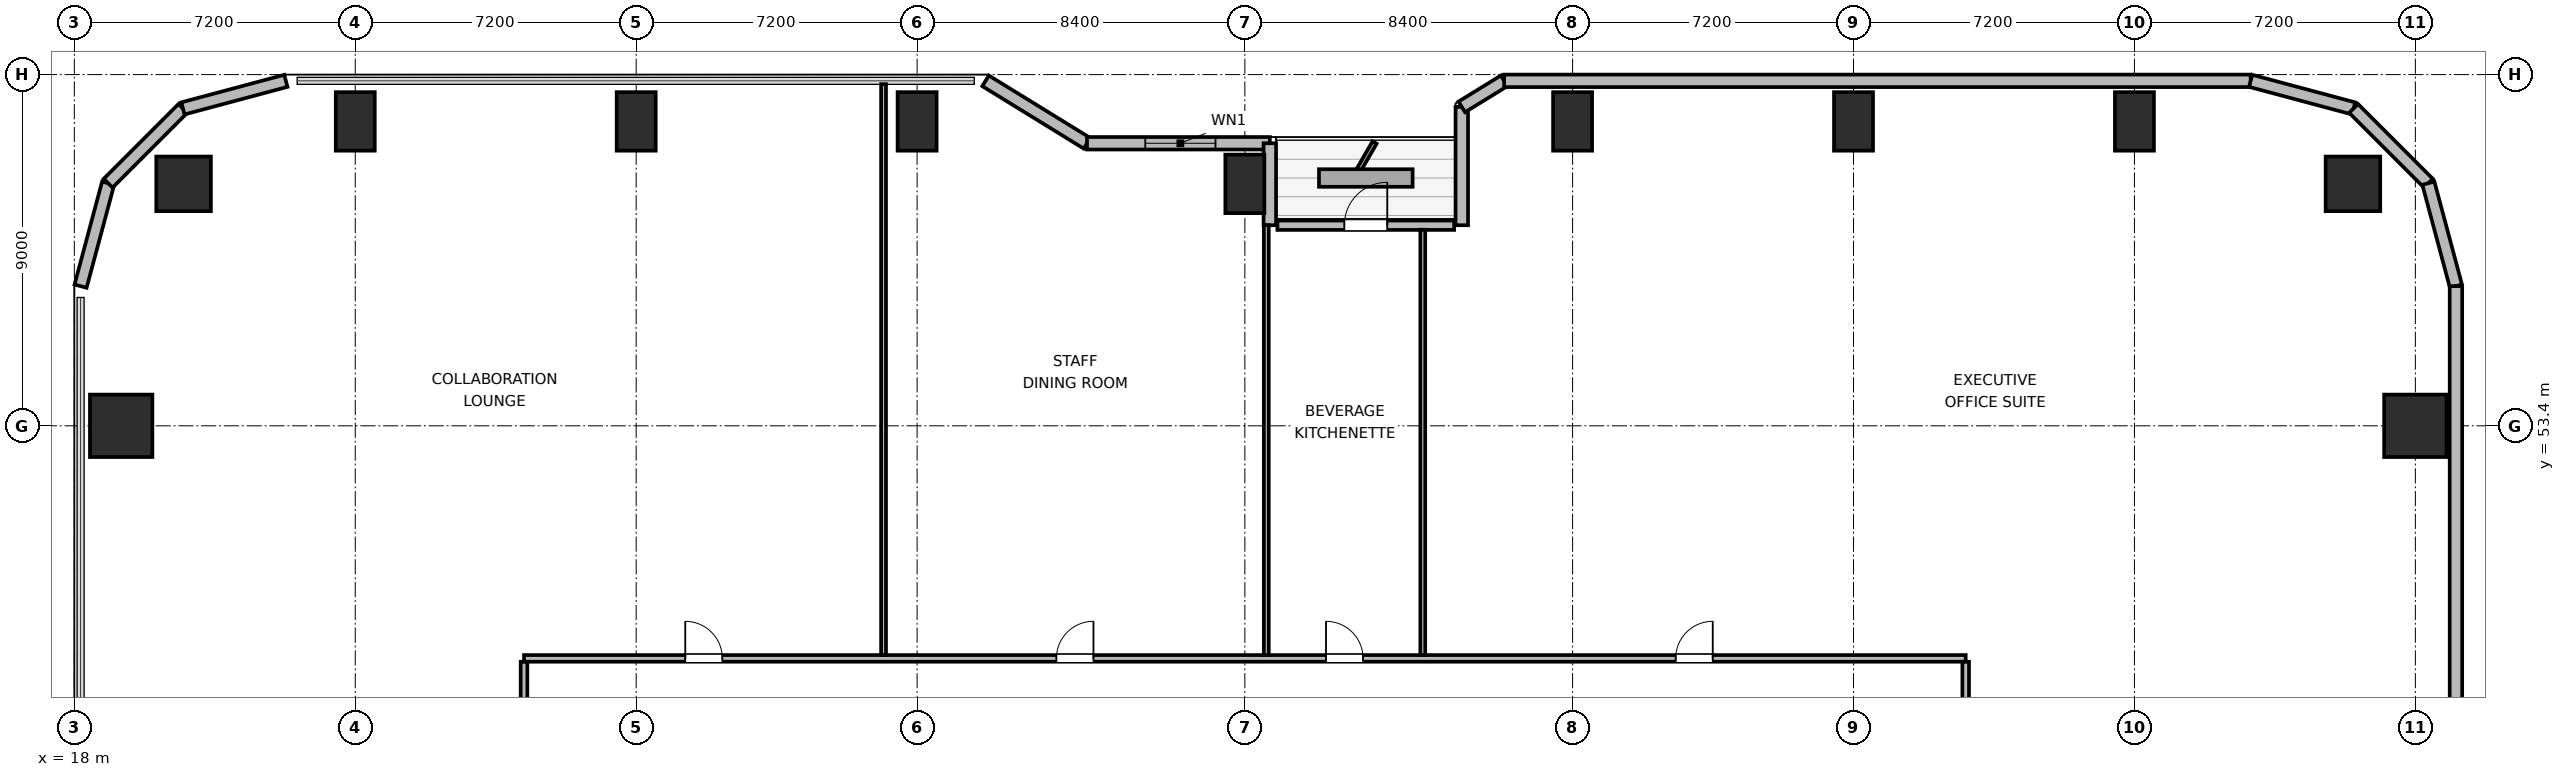
"""IFC4 building model, lengths in metres.
Left out: names, types, materials, properties, quantities, classifications, styles, units other than length and angle.
Written with IfcOpenShell. Run it as: python <this file> out.ifc"""

import sys

from ifc_helpers import new_model, si_unit, direction, frame, frame_2d, origin, origin_2d, place, context, subcontext, project, spatial, rectangle, circle, extrude, element, fill, save


model = new_model("IFC4")
c1 = context("Model", 3, precision=1e-05, world=origin(), true_north=direction((0.0, 1.0)))
c2 = subcontext(c1, "Body", "Model", "MODEL_VIEW")
j1 = project(units=[si_unit("LENGTHUNIT", "METRE"), si_unit("PLANEANGLEUNIT", "RADIAN")], contexts=[c1])
p1 = place(None, origin())
s1 = spatial("IfcSite", under=j1, at=p1, CompositionType="ELEMENT")
p2 = place(p1, origin())
s2 = spatial("IfcBuilding", under=s1, at=p2, CompositionType="ELEMENT")
p3 = place(p2, frame((0.0, 0.0, 56.7)))
s3 = spatial("IfcBuildingStorey", under=s2, at=p3, CompositionType="ELEMENT", Elevation=56.7)
for number, where, z_axis, x_axis in (
    (1, (76.4, 59.6, 0.0), (0.0, 0.0, 1.0), (1.0, 0.0, 0.0)),
    (2, (20.8, 59.6, 0.0), (0.0, 0.0, 1.0), (1.0, 0.0, 0.0)),
):
    element("IfcColumn", number, at=place(p3, frame(where, z_axis=z_axis, x_axis=x_axis)), inside=s3, PredefinedType="COLUMN", context=c2, shape_type="SweptSolid", body=[
        extrude(circle(Radius=0.7, at=origin_2d()), origin(), (0.0, 0.0, 1.0), 3.9),
    ])
for number, where, z_axis, x_axis in (
    (3, (25.2, 61.2, 0.0), (0.0, 0.0, 1.0), (1.0, 0.0, 0.0)),
    (4, (32.4, 61.2, 0.0), (0.0, 0.0, 1.0), (1.0, 0.0, 0.0)),
    (5, (39.6, 61.2, 0.0), (0.0, 0.0, 1.0), (1.0, 0.0, 0.0)),
    (6, (48.0, 59.6, 0.0), (0.0, 0.0, 1.0), (1.0, 0.0, 0.0)),
    (7, (56.4, 61.2, 0.0), (0.0, 0.0, 1.0), (1.0, 0.0, 0.0)),
    (8, (63.6, 61.2, 0.0), (0.0, 0.0, 1.0), (1.0, 0.0, 0.0)),
    (9, (70.8, 61.2, 0.0), (0.0, 0.0, 1.0), (1.0, 0.0, 0.0)),
):
    element("IfcColumn", number, at=place(p3, frame(where, z_axis=z_axis, x_axis=x_axis)), inside=s3, PredefinedType="COLUMN", context=c2, shape_type="SweptSolid", body=[
        extrude(rectangle(XDim=1.0, YDim=1.5, at=origin_2d()), origin(), (0.0, 0.0, 1.0), 3.9),
    ])
for number, where, z_axis, x_axis in (
    (10, (19.2, 53.4, 0.0), (0.0, 0.0, 1.0), (1.0, 0.0, 0.0)),
    (11, (78.0, 53.4, 0.0), (0.0, 0.0, 1.0), (1.0, 0.0, 0.0)),
):
    element("IfcColumn", number, at=place(p3, frame(where, z_axis=z_axis, x_axis=x_axis)), inside=s3, PredefinedType="COLUMN", context=c2, shape_type="SweptSolid", body=[
        extrude(rectangle(XDim=1.6, YDim=1.6, at=origin_2d()), origin(), (0.0, 0.0, 1.0), 3.9),
    ])
p4 = place(p3, frame((18.16, 56.979, 0.0), z_axis=(0.0, 0.0, 1.0), x_axis=(0.25869736047, 0.965958423373, 0.0)))
e12 = element("IfcWall", 12, at=p4, inside=s3, PredefinedType="SOLIDWALL", context=c2, shape_type="SweptSolid", body=[
    extrude(rectangle(XDim=2.731, YDim=0.32, at=frame_2d((1.366, 0.0))), origin(), (0.0, 0.0, 1.0), 3.64),
])
p5 = place(p3, frame((18.866, 59.617, 0.0), z_axis=(0.0, 0.0, 1.0), x_axis=(0.707106781187, 0.707106781187, 0.0)))
e13 = element("IfcWall", 13, at=p5, inside=s3, PredefinedType="SOLIDWALL", context=c2, shape_type="SweptSolid", body=[
    extrude(rectangle(XDim=2.71, YDim=0.32, at=frame_2d((1.355, 0.0))), origin(), (0.0, 0.0, 1.0), 3.64),
])
p6 = place(p3, frame((20.783, 61.533, 0.0), z_axis=(0.0, 0.0, 1.0), x_axis=(0.965964405026, 0.25867502435, 0.0)))
e14 = element("IfcWall", 14, at=p6, inside=s3, PredefinedType="SOLIDWALL", context=c2, shape_type="SweptSolid", body=[
    extrude(rectangle(XDim=2.731, YDim=0.32, at=frame_2d((1.366, 0.0))), origin(), (0.0, 0.0, 1.0), 3.64),
])
p7 = place(p3, frame((41.355, 62.24, 0.0), z_axis=(0.0, 0.0, 1.0), x_axis=(0.851630857047, -0.524142044989, 0.0)))
e15 = element("IfcWall", 15, at=p7, inside=s3, PredefinedType="SOLIDWALL", context=c2, shape_type="SweptSolid", body=[
    extrude(rectangle(XDim=3.053, YDim=0.32, at=frame_2d((1.526, 0.0))), origin(), (0.0, 0.0, 1.0), 2.875),
])
p8 = place(p3, frame((43.955, 60.64, 0.0), z_axis=(0.0, 0.0, 1.0), x_axis=(1.0, 0.0, 0.0)))
e16 = element("IfcWall", 16, at=p8, inside=s3, PredefinedType="SOLIDWALL", context=c2, shape_type="SweptSolid", body=[
    extrude(rectangle(XDim=4.685, YDim=0.32, at=frame_2d((2.343, 0.0))), origin(), (0.0, 0.0, 1.0), 2.875),
])
p9 = place(p8, frame((1.493, 0.0, 0.85)))
e17 = element("IfcOpeningElement", 17, at=p9, cuts=e16, PredefinedType="OPENING", context=c2, shape_type="SweptSolid", body=[
    extrude(rectangle(XDim=1.8, YDim=1.1, at=frame_2d((0.9, 0.55))), frame((0.0, 0.17, 0.0), z_axis=(0.0, -1.0, 0.0), x_axis=(1.0, 0.0, 0.0)), (0.0, 0.0, 1.0), 0.34),
])
p10 = place(p3, frame((48.64, 60.64, 0.0), z_axis=(0.0, 0.0, 1.0), x_axis=(0.0, -1.0, 0.0)))
e18 = element("IfcWall", 18, at=p10, inside=s3, PredefinedType="SOLIDWALL", context=c2, shape_type="SweptSolid", body=[
    extrude(rectangle(XDim=2.1, YDim=0.32, at=frame_2d((1.05, 0.0))), origin(), (0.0, 0.0, 1.0), 2.875),
])
p11 = place(p3, frame((48.835, 58.54, 0.0), z_axis=(0.0, 0.0, 1.0), x_axis=(1.0, 0.0, 0.0)))
e19 = element("IfcWall", 19, at=p11, inside=s3, PredefinedType="SOLIDWALL", context=c2, shape_type="SweptSolid", body=[
    extrude(rectangle(XDim=4.53, YDim=0.24, at=frame_2d((2.265, 0.0))), origin(), (0.0, 0.0, 1.0), 3.64),
])
p12 = place(p11, frame((1.715, 0.0, 0.0)))
e20 = element("IfcOpeningElement", 20, at=p12, cuts=e19, PredefinedType="OPENING", context=c2, shape_type="SweptSolid", body=[
    extrude(rectangle(XDim=1.1, YDim=2.04, at=frame_2d((0.55, 1.02))), frame((0.0, 0.13, 0.0), z_axis=(0.0, -1.0, 0.0), x_axis=(1.0, 0.0, 0.0)), (0.0, 0.0, 1.0), 0.26),
])
p13 = place(p3, frame((53.56, 58.54, 0.0), z_axis=(0.0, 0.0, 1.0), x_axis=(0.0, 1.0, 0.0)))
e21 = element("IfcWall", 21, at=p13, inside=s3, PredefinedType="SOLIDWALL", context=c2, shape_type="SweptSolid", body=[
    extrude(rectangle(XDim=3.032, YDim=0.32, at=frame_2d((1.516, 0.0))), origin(), (0.0, 0.0, 1.0), 2.875),
])
p14 = place(p3, frame((53.56, 61.573, 0.0), z_axis=(0.0, 0.0, 1.0), x_axis=(0.851776724646, 0.523904964045, 0.0)))
e22 = element("IfcWall", 22, at=p14, inside=s3, PredefinedType="SOLIDWALL", context=c2, shape_type="SweptSolid", body=[
    extrude(rectangle(XDim=1.274, YDim=0.32, at=frame_2d((0.637, 0.0))), origin(), (0.0, 0.0, 1.0), 3.64),
])
p15 = place(p3, frame((54.645, 62.24, 0.0), z_axis=(0.0, 0.0, 1.0), x_axis=(1.0, 0.0, 0.0)))
e23 = element("IfcWall", 23, at=p15, inside=s3, PredefinedType="SOLIDWALL", context=c2, shape_type="SweptSolid", body=[
    extrude(rectangle(XDim=19.134, YDim=0.32, at=frame_2d((9.567, 0.0))), origin(), (0.0, 0.0, 1.0), 3.64),
])
p16 = place(p3, frame((73.779, 62.24, 0.0), z_axis=(0.0, 0.0, 1.0), x_axis=(0.965964405026, -0.25867502435, 0.0)))
e24 = element("IfcWall", 24, at=p16, inside=s3, PredefinedType="SOLIDWALL", context=c2, shape_type="SweptSolid", body=[
    extrude(rectangle(XDim=2.731, YDim=0.32, at=frame_2d((1.366, 0.0))), origin(), (0.0, 0.0, 1.0), 3.64),
])
p17 = place(p3, frame((76.417, 61.533, 0.0), z_axis=(0.0, 0.0, 1.0), x_axis=(0.707106781187, -0.707106781187, 0.0)))
e25 = element("IfcWall", 25, at=p17, inside=s3, PredefinedType="SOLIDWALL", context=c2, shape_type="SweptSolid", body=[
    extrude(rectangle(XDim=2.71, YDim=0.32, at=frame_2d((1.355, 0.0))), origin(), (0.0, 0.0, 1.0), 3.64),
])
p18 = place(p3, frame((78.333, 59.617, 0.0), z_axis=(0.0, 0.0, 1.0), x_axis=(0.25869736047, -0.965958423373, 0.0)))
e26 = element("IfcWall", 26, at=p18, inside=s3, PredefinedType="SOLIDWALL", context=c2, shape_type="SweptSolid", body=[
    extrude(rectangle(XDim=2.731, YDim=0.32, at=frame_2d((1.366, 0.0))), origin(), (0.0, 0.0, 1.0), 3.64),
])
p19 = place(p3, frame((79.04, 56.979, 0.0), z_axis=(0.0, 0.0, 1.0), x_axis=(0.0, -1.0, 0.0)))
e27 = element("IfcWall", 27, at=p19, inside=s3, PredefinedType="SOLIDWALL", context=c2, shape_type="SweptSolid", body=[
    extrude(rectangle(XDim=14.219, YDim=0.32, at=frame_2d((7.109, 0.0))), origin(), (0.0, 0.0, 1.0), 3.64),
])
p20 = place(p3, frame((29.525, 47.44, 0.0), z_axis=(0.0, 0.0, 1.0), x_axis=(1.0, 0.0, 0.0)))
e28 = element("IfcWall", 28, at=p20, inside=s3, PredefinedType="PARTITIONING", context=c2, shape_type="SweptSolid", body=[
    extrude(rectangle(XDim=36.95, YDim=0.17, at=frame_2d((18.475, 0.0))), origin(), (0.0, 0.0, 1.0), 3.64),
])
p21 = place(p20, frame((4.133, 0.0, 0.0)))
e29 = element("IfcOpeningElement", 29, at=p21, cuts=e28, PredefinedType="OPENING", context=c2, shape_type="SweptSolid", body=[
    extrude(rectangle(XDim=0.95, YDim=2.04, at=frame_2d((0.475, 1.02))), frame((0.0, 0.095, 0.0), z_axis=(0.0, -1.0, 0.0), x_axis=(1.0, 0.0, 0.0)), (0.0, 0.0, 1.0), 0.19),
])
p22 = place(p20, frame((13.645, 0.0, 0.0)))
e30 = element("IfcOpeningElement", 30, at=p22, cuts=e28, PredefinedType="OPENING", context=c2, shape_type="SweptSolid", body=[
    extrude(rectangle(XDim=0.95, YDim=2.04, at=frame_2d((0.475, 1.02))), frame((0.0, 0.095, 0.0), z_axis=(0.0, -1.0, 0.0), x_axis=(1.0, 0.0, 0.0)), (0.0, 0.0, 1.0), 0.19),
])
p23 = place(p20, frame((20.555, 0.0, 0.0)))
e31 = element("IfcOpeningElement", 31, at=p23, cuts=e28, PredefinedType="OPENING", context=c2, shape_type="SweptSolid", body=[
    extrude(rectangle(XDim=0.95, YDim=2.04, at=frame_2d((0.475, 1.02))), frame((0.0, 0.095, 0.0), z_axis=(0.0, -1.0, 0.0), x_axis=(1.0, 0.0, 0.0)), (0.0, 0.0, 1.0), 0.19),
])
p24 = place(p20, frame((29.517, 0.0, 0.0)))
e32 = element("IfcOpeningElement", 32, at=p24, cuts=e28, PredefinedType="OPENING", context=c2, shape_type="SweptSolid", body=[
    extrude(rectangle(XDim=0.95, YDim=2.04, at=frame_2d((0.475, 1.02))), frame((0.0, 0.095, 0.0), z_axis=(0.0, -1.0, 0.0), x_axis=(1.0, 0.0, 0.0)), (0.0, 0.0, 1.0), 0.19),
])
p25 = place(p3, frame((29.525, 24.647, 0.0), z_axis=(0.0, 0.0, 1.0), x_axis=(0.0, 1.0, 0.0)))
e33 = element("IfcWall", 33, at=p25, inside=s3, PredefinedType="PARTITIONING", context=c2, shape_type="SweptSolid", body=[
    extrude(rectangle(XDim=22.706, YDim=0.17, at=frame_2d((11.353, 0.0))), origin(), (0.0, 0.0, 1.0), 3.64),
])
p26 = place(p25, frame((4.758, 0.0, 0.0)))
e34 = element("IfcOpeningElement", 34, at=p26, cuts=e33, PredefinedType="OPENING", context=c2, shape_type="SweptSolid", body=[
    extrude(rectangle(XDim=0.95, YDim=2.04, at=frame_2d((0.475, 1.02))), frame((0.0, 0.095, 0.0), z_axis=(0.0, -1.0, 0.0), x_axis=(1.0, 0.0, 0.0)), (0.0, 0.0, 1.0), 0.19),
])
p27 = place(p25, frame((16.198, 0.0, 0.0)))
e35 = element("IfcOpeningElement", 35, at=p27, cuts=e33, PredefinedType="OPENING", context=c2, shape_type="SweptSolid", body=[
    extrude(rectangle(XDim=0.95, YDim=2.04, at=frame_2d((0.475, 1.02))), frame((0.0, 0.095, 0.0), z_axis=(0.0, -1.0, 0.0), x_axis=(1.0, 0.0, 0.0)), (0.0, 0.0, 1.0), 0.19),
])
p28 = place(p3, frame((66.475, 24.647, 0.0), z_axis=(0.0, 0.0, 1.0), x_axis=(0.0, 1.0, 0.0)))
e36 = element("IfcWall", 36, at=p28, inside=s3, PredefinedType="PARTITIONING", context=c2, shape_type="SweptSolid", body=[
    extrude(rectangle(XDim=22.706, YDim=0.17, at=frame_2d((11.353, 0.0))), origin(), (0.0, 0.0, 1.0), 3.64),
])
p29 = place(p28, frame((5.758, 0.0, 0.0)))
e37 = element("IfcOpeningElement", 37, at=p29, cuts=e36, PredefinedType="OPENING", context=c2, shape_type="SweptSolid", body=[
    extrude(rectangle(XDim=0.95, YDim=2.04, at=frame_2d((0.475, 1.02))), frame((0.0, 0.095, 0.0), z_axis=(0.0, -1.0, 0.0), x_axis=(1.0, 0.0, 0.0)), (0.0, 0.0, 1.0), 0.19),
])
p30 = place(p28, frame((17.198, 0.0, 0.0)))
e38 = element("IfcOpeningElement", 38, at=p30, cuts=e36, PredefinedType="OPENING", context=c2, shape_type="SweptSolid", body=[
    extrude(rectangle(XDim=0.95, YDim=2.04, at=frame_2d((0.475, 1.02))), frame((0.0, 0.095, 0.0), z_axis=(0.0, -1.0, 0.0), x_axis=(1.0, 0.0, 0.0)), (0.0, 0.0, 1.0), 0.19),
])
p31 = place(p3, frame((38.74, 47.527, 0.0), z_axis=(0.0, 0.0, 1.0), x_axis=(0.0, 1.0, 0.0)))
e39 = element("IfcWall", 39, at=p31, inside=s3, PredefinedType="PARTITIONING", context=c2, shape_type="SweptSolid", body=[
    extrude(rectangle(XDim=14.628, YDim=0.125, at=frame_2d((7.314, 0.0))), origin(), (0.0, 0.0, 1.0), 3.64),
])
p32 = place(p3, frame((48.55, 47.527, 0.0), z_axis=(0.0, 0.0, 1.0), x_axis=(0.0, 1.0, 0.0)))
e40 = element("IfcWall", 40, at=p32, inside=s3, PredefinedType="PARTITIONING", context=c2, shape_type="SweptSolid", body=[
    extrude(rectangle(XDim=11.013, YDim=0.125, at=frame_2d((5.506, 0.0))), origin(), (0.0, 0.0, 1.0), 3.64),
])
p33 = place(p3, frame((52.56, 47.527, 0.0), z_axis=(0.0, 0.0, 1.0), x_axis=(0.0, 1.0, 0.0)))
e41 = element("IfcWall", 41, at=p33, inside=s3, PredefinedType="PARTITIONING", context=c2, shape_type="SweptSolid", body=[
    extrude(rectangle(XDim=10.898, YDim=0.125, at=frame_2d((5.449, 0.0))), origin(), (0.0, 0.0, 1.0), 3.003),
])
p34 = place(p9, origin())
e42 = element("IfcWindow", 42, at=p34, inside=s3, PartitioningType="SINGLE_PANEL", PredefinedType="WINDOW", context=c2, shape_type="SweptSolid", body=[
    extrude(rectangle(XDim=1.8, YDim=1.1, at=frame_2d((0.9, 0.55))), frame((0.0, 0.03, 0.0), z_axis=(0.0, -1.0, 0.0), x_axis=(1.0, 0.0, 0.0)), (0.0, 0.0, 1.0), 0.06),
])
fill(e17, e42)
p35 = place(p12, origin())
e43 = element("IfcDoor", 43, at=p35, inside=s3, OperationType="SINGLE_SWING_RIGHT", PredefinedType="DOOR", context=c2, shape_type="SweptSolid", body=[
    extrude(rectangle(XDim=1.1, YDim=2.04, at=frame_2d((0.55, 1.02))), frame((0.0, 0.025, 0.0), z_axis=(0.0, -1.0, 0.0), x_axis=(1.0, 0.0, 0.0)), (0.0, 0.0, 1.0), 0.05),
])
fill(e20, e43)
p36 = place(p21, origin())
e44 = element("IfcDoor", 44, at=p36, inside=s3, OperationType="SINGLE_SWING_LEFT", PredefinedType="DOOR", context=c2, shape_type="SweptSolid", body=[
    extrude(rectangle(XDim=0.95, YDim=2.04, at=frame_2d((0.475, 1.02))), frame((0.0, 0.025, 0.0), z_axis=(0.0, -1.0, 0.0), x_axis=(1.0, 0.0, 0.0)), (0.0, 0.0, 1.0), 0.05),
])
fill(e29, e44)
p37 = place(p22, origin())
e45 = element("IfcDoor", 45, at=p37, inside=s3, OperationType="SINGLE_SWING_RIGHT", PredefinedType="DOOR", context=c2, shape_type="SweptSolid", body=[
    extrude(rectangle(XDim=0.95, YDim=2.04, at=frame_2d((0.475, 1.02))), frame((0.0, 0.025, 0.0), z_axis=(0.0, -1.0, 0.0), x_axis=(1.0, 0.0, 0.0)), (0.0, 0.0, 1.0), 0.05),
])
fill(e30, e45)
p38 = place(p23, origin())
e46 = element("IfcDoor", 46, at=p38, inside=s3, OperationType="SINGLE_SWING_LEFT", PredefinedType="DOOR", context=c2, shape_type="SweptSolid", body=[
    extrude(rectangle(XDim=0.95, YDim=2.04, at=frame_2d((0.475, 1.02))), frame((0.0, 0.025, 0.0), z_axis=(0.0, -1.0, 0.0), x_axis=(1.0, 0.0, 0.0)), (0.0, 0.0, 1.0), 0.05),
])
fill(e31, e46)
p39 = place(p24, origin())
e47 = element("IfcDoor", 47, at=p39, inside=s3, OperationType="SINGLE_SWING_RIGHT", PredefinedType="DOOR", context=c2, shape_type="SweptSolid", body=[
    extrude(rectangle(XDim=0.95, YDim=2.04, at=frame_2d((0.475, 1.02))), frame((0.0, 0.025, 0.0), z_axis=(0.0, -1.0, 0.0), x_axis=(1.0, 0.0, 0.0)), (0.0, 0.0, 1.0), 0.05),
])
fill(e32, e47)
save(model, sys.argv[1])
